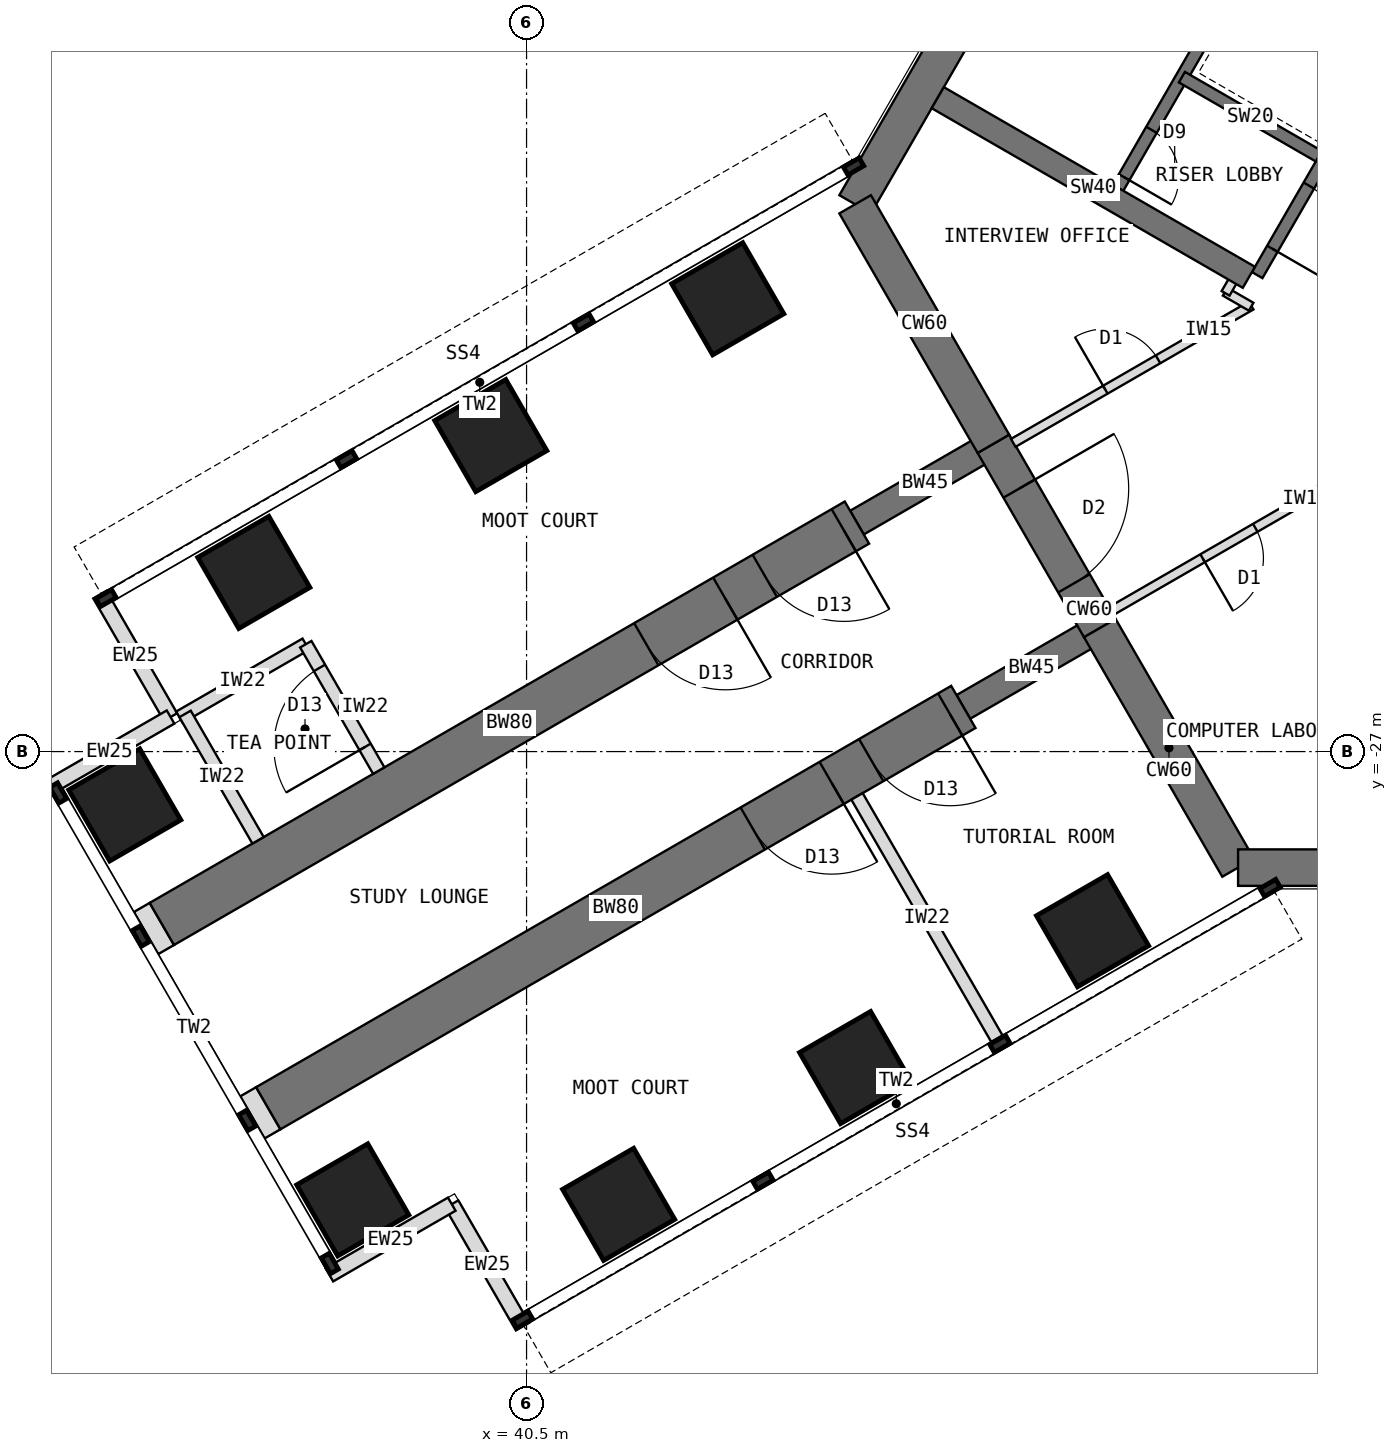
"""IFC4 building model, lengths in metres.
Left out: names, types, materials, properties, quantities, classifications, styles, units other than length and angle.
Written with IfcOpenShell. Run it as: python <this file> out.ifc"""

import sys

from ifc_helpers import new_model, si_unit, direction, frame, frame_2d, origin, origin_2d, place, context, subcontext, project, spatial, rectangle, extrude, element, fill, save


model = new_model("IFC4")
c1 = context("Model", 3, precision=1e-05, world=origin(), true_north=direction((0.0, 1.0)))
c2 = subcontext(c1, "Body", "Model", "MODEL_VIEW")
j1 = project(units=[si_unit("LENGTHUNIT", "METRE"), si_unit("PLANEANGLEUNIT", "RADIAN")], contexts=[c1])
p1 = place(None, origin())
s1 = spatial("IfcSite", under=j1, at=p1, CompositionType="ELEMENT")
p2 = place(p1, origin())
s2 = spatial("IfcBuilding", under=s1, at=p2, CompositionType="ELEMENT")
p3 = place(p2, frame((0.0, 0.0, 101.5)))
s3 = spatial("IfcBuildingStorey", under=s2, at=p3, CompositionType="ELEMENT", Elevation=101.5)
p4 = place(p3, frame((52.202, -7.092, 0.0), z_axis=(0.0, 0.0, 1.0), x_axis=(-0.500005998175, -0.866021940709, 0.0)))
e1 = element("IfcWall", 1, at=p4, inside=s3, PredefinedType="SHEAR", context=c2, shape_type="SweptSolid", body=[
    extrude(rectangle(XDim=12.596, YDim=0.6, at=frame_2d((6.298, 0.0))), origin(), (0.0, 0.0, 1.0), 4.0),
])
p5 = place(p3, frame((45.904, -18.0, 0.0), z_axis=(0.0, 0.0, 1.0), x_axis=(0.500024481964, -0.866011268655, 0.0)))
e2 = element("IfcWall", 2, at=p5, inside=s3, PredefinedType="SHEAR", context=c2, shape_type="SweptSolid", body=[
    extrude(rectangle(XDim=4.548, YDim=0.6, at=frame_2d((2.274, 0.0))), origin(), (0.0, 0.0, 1.0), 4.0),
])
p6 = place(p3, frame((48.178, -21.939, 0.0), z_axis=(0.0, 0.0, 1.0), x_axis=(0.500010275428, -0.866019471182, 0.0)))
e3 = element("IfcWall", 3, at=p6, inside=s3, PredefinedType="SHEAR", context=c2, shape_type="SweptSolid", body=[
    extrude(rectangle(XDim=3.5, YDim=0.6, at=frame_2d((1.75, 0.0))), origin(), (0.0, 0.0, 1.0), 4.0),
])
p7 = place(p6, frame((0.85, 0.0, 0.0)))
e4 = element("IfcOpeningElement", 4, at=p7, cuts=e3, PredefinedType="OPENING", context=c2, shape_type="SweptSolid", body=[
    extrude(rectangle(XDim=1.8, YDim=2.1, at=frame_2d((0.9, 1.05))), frame((0.0, 0.31, 0.0), z_axis=(0.0, -1.0, 0.0), x_axis=(1.0, 0.0, 0.0)), (0.0, 0.0, 1.0), 0.62),
])
p8 = place(p3, frame((49.928, -24.97, 0.0), z_axis=(0.0, 0.0, 1.0), x_axis=(0.499984222037, -0.866034513004, 0.0)))
e5 = element("IfcWall", 5, at=p8, inside=s3, PredefinedType="SHEAR", context=c2, shape_type="SweptSolid", body=[
    extrude(rectangle(XDim=4.548, YDim=0.6, at=frame_2d((2.274, 0.0))), origin(), (0.0, 0.0, 1.0), 4.0),
])
p9 = place(p3, frame((52.202, -28.908, 0.0), z_axis=(0.0, 0.0, 1.0), x_axis=(1.0, 0.0, 0.0)))
e6 = element("IfcWall", 6, at=p9, inside=s3, PredefinedType="SHEAR", context=c2, shape_type="SweptSolid", body=[
    extrude(rectangle(XDim=12.596, YDim=0.6, at=frame_2d((6.298, 0.0))), origin(), (0.0, 0.0, 1.0), 4.0),
])
p10 = place(p3, frame((49.928, -24.97, 0.0), z_axis=(0.0, 0.0, 1.0), x_axis=(-0.866031863473, -0.499988811324, 0.0)))
e7 = element("IfcWall", 7, at=p10, inside=s3, PredefinedType="SHEAR", context=c2, shape_type="SweptSolid", body=[
    extrude(rectangle(XDim=2.592, YDim=0.45, at=frame_2d((1.296, 0.0))), origin(), (0.0, 0.0, 1.0), 4.0),
])
p11 = place(p3, frame((47.684, -26.266, 0.0), z_axis=(0.0, 0.0, 1.0), x_axis=(-0.866027579429, -0.499996231654, 0.0)))
e8 = element("IfcWall", 8, at=p11, inside=s3, PredefinedType="SHEAR", context=c2, shape_type="SweptSolid", body=[
    extrude(rectangle(XDim=13.2, YDim=0.8, at=frame_2d((6.6, 0.0))), origin(), (0.0, 0.0, 1.0), 4.0),
])
p12 = place(p11, frame((0.25, 0.0, 0.0)))
e9 = element("IfcOpeningElement", 9, at=p12, cuts=e8, PredefinedType="OPENING", context=c2, shape_type="SweptSolid", body=[
    extrude(rectangle(XDim=1.5, YDim=2.1, at=frame_2d((0.75, 1.05))), frame((0.0, 0.41, 0.0), z_axis=(0.0, -1.0, 0.0), x_axis=(1.0, 0.0, 0.0)), (0.0, 0.0, 1.0), 0.82),
])
p13 = place(p11, frame((2.5, 0.0, 0.0)))
e10 = element("IfcOpeningElement", 10, at=p13, cuts=e8, PredefinedType="OPENING", context=c2, shape_type="SweptSolid", body=[
    extrude(rectangle(XDim=1.5, YDim=2.1, at=frame_2d((0.75, 1.05))), frame((0.0, 0.41, 0.0), z_axis=(0.0, -1.0, 0.0), x_axis=(1.0, 0.0, 0.0)), (0.0, 0.0, 1.0), 0.82),
])
p14 = place(p3, frame((48.178, -21.939, 0.0), z_axis=(0.0, 0.0, 1.0), x_axis=(-0.866072649678, -0.499918158782, 0.0)))
e11 = element("IfcWall", 11, at=p14, inside=s3, PredefinedType="SHEAR", context=c2, shape_type="SweptSolid", body=[
    extrude(rectangle(XDim=2.592, YDim=0.45, at=frame_2d((1.296, 0.0))), origin(), (0.0, 0.0, 1.0), 4.0),
])
p15 = place(p3, frame((45.934, -23.234, 0.0), z_axis=(0.0, 0.0, 1.0), x_axis=(-0.866019570528, -0.500010103361, 0.0)))
e12 = element("IfcWall", 12, at=p15, inside=s3, PredefinedType="SHEAR", context=c2, shape_type="SweptSolid", body=[
    extrude(rectangle(XDim=13.2, YDim=0.8, at=frame_2d((6.6, 0.0))), origin(), (0.0, 0.0, 1.0), 4.0),
])
p16 = place(p15, frame((0.25, 0.0, 0.0)))
e13 = element("IfcOpeningElement", 13, at=p16, cuts=e12, PredefinedType="OPENING", context=c2, shape_type="SweptSolid", body=[
    extrude(rectangle(XDim=1.5, YDim=2.1, at=frame_2d((0.75, 1.05))), frame((0.0, 0.41, 0.0), z_axis=(0.0, -1.0, 0.0), x_axis=(1.0, 0.0, 0.0)), (0.0, 0.0, 1.0), 0.82),
])
p17 = place(p15, frame((2.5, 0.0, 0.0)))
e14 = element("IfcOpeningElement", 14, at=p17, cuts=e12, PredefinedType="OPENING", context=c2, shape_type="SweptSolid", body=[
    extrude(rectangle(XDim=1.5, YDim=2.1, at=frame_2d((0.75, 1.05))), frame((0.0, 0.41, 0.0), z_axis=(0.0, -1.0, 0.0), x_axis=(1.0, 0.0, 0.0)), (0.0, 0.0, 1.0), 0.82),
])
for number, where, z_axis, x_axis in (
    (15, (49.809, -29.946, 0.0), (0.0, 0.0, 1.0), (0.866, 0.5, 0.0)),
    (16, (43.809, -19.554, 0.0), (0.0, 0.0, 1.0), (0.866, 0.5, 0.0)),
    (17, (45.912, -32.196, 0.0), (0.0, 0.0, 1.0), (0.866, 0.5, 0.0)),
    (18, (39.912, -21.804, 0.0), (0.0, 0.0, 1.0), (0.866, 0.5, 0.0)),
    (19, (42.014, -34.446, 0.0), (0.0, 0.0, 1.0), (0.866, 0.5, 0.0)),
    (20, (36.014, -24.054, 0.0), (0.0, 0.0, 1.0), (0.866, 0.5, 0.0)),
    (21, (37.642, -34.373, 0.0), (0.0, 0.0, 1.0), (0.866, 0.5, 0.0)),
    (22, (33.892, -27.877, 0.0), (0.0, 0.0, 1.0), (0.866, 0.5, 0.0)),
):
    element("IfcColumn", number, at=place(p3, frame(where, z_axis=z_axis, x_axis=x_axis)), inside=s3, PredefinedType="COLUMN", context=c2, shape_type="SweptSolid", body=[
        extrude(rectangle(XDim=1.35, YDim=1.35, at=origin_2d()), origin(), (0.0, 0.0, 1.0), 4.0),
    ])
for number, where, z_axis, x_axis in (
    (23, (40.433, -36.456, 0.0), (0.0, 0.0, 1.0), (-0.5, 0.866, 0.0)),
    (24, (39.27, -34.443, 0.0), (0.0, 0.0, 1.0), (-0.866, -0.5, 0.0)),
    (25, (33.483, -24.419, 0.0), (0.0, 0.0, 1.0), (0.5, -0.866, 0.0)),
    (26, (34.645, -26.432, 0.0), (0.0, 0.0, 1.0), (-0.866, -0.5, 0.0)),
):
    element("IfcWall", number, at=place(p3, frame(where, z_axis=z_axis, x_axis=x_axis)), inside=s3, PredefinedType="STANDARD", context=c2, shape_type="SweptSolid", body=[
        extrude(rectangle(XDim=2.325, YDim=0.25, at=frame_2d((1.163, 0.0))), origin(), (0.0, 0.0, 1.0), 3.8),
    ])
p18 = place(p3, frame((36.252, -32.865, 0.0), z_axis=(0.0, 0.0, 1.0), x_axis=(-0.865778900179, -0.500426713919, 0.0)))
e27 = element("IfcWall", 27, at=p18, inside=s3, PredefinedType="PARTITIONING", context=c2, shape_type="SweptSolid", body=[
    extrude(rectangle(XDim=0.3, YDim=0.8, at=frame_2d((0.15, 0.0))), origin(), (0.0, 0.0, 1.0), 3.8),
])
p19 = place(p3, frame((34.502, -29.834, 0.0), z_axis=(0.0, 0.0, 1.0), x_axis=(-0.866131372301, -0.499816412211, 0.0)))
e28 = element("IfcWall", 28, at=p19, inside=s3, PredefinedType="PARTITIONING", context=c2, shape_type="SweptSolid", body=[
    extrude(rectangle(XDim=0.3, YDim=0.8, at=frame_2d((0.15, 0.0))), origin(), (0.0, 0.0, 1.0), 3.8),
])
p20 = place(p3, frame((56.516, -12.236, 0.0), z_axis=(0.0, 0.0, 1.0), x_axis=(-0.49999894854, -0.866026010844, 0.0)))
e29 = element("IfcWall", 29, at=p20, inside=s3, PredefinedType="SHEAR", context=c2, shape_type="SweptSolid", body=[
    extrude(rectangle(XDim=8.0, YDim=0.2, at=frame_2d((4.0, 0.0))), origin(), (0.0, 0.0, 1.0), 4.0),
])
p21 = place(p20, frame((6.3, 0.0, 0.0)))
e30 = element("IfcOpeningElement", 30, at=p21, cuts=e29, PredefinedType="OPENING", context=c2, shape_type="SweptSolid", body=[
    extrude(rectangle(XDim=1.2, YDim=2.1, at=frame_2d((0.6, 1.05))), frame((0.0, 0.11, 0.0), z_axis=(0.0, -1.0, 0.0), x_axis=(1.0, 0.0, 0.0)), (0.0, 0.0, 1.0), 0.22),
])
p22 = place(p3, frame((53.53, -17.209, 0.0), z_axis=(0.0, 0.0, 1.0), x_axis=(-0.866062058628, 0.499936506574, 0.0)))
e31 = element("IfcWall", 31, at=p22, inside=s3, PredefinedType="SHEAR", context=c2, shape_type="SweptSolid", body=[
    extrude(rectangle(XDim=2.6, YDim=0.2, at=frame_2d((1.3, 0.0))), origin(), (0.0, 0.0, 1.0), 4.0),
])
p23 = place(p3, frame((54.178, -10.886, 0.0), z_axis=(0.0, 0.0, 1.0), x_axis=(-0.49999894854, -0.866026010844, 0.0)))
e32 = element("IfcWall", 32, at=p23, inside=s3, PredefinedType="SHEAR", context=c2, shape_type="SweptSolid", body=[
    extrude(rectangle(XDim=8.0, YDim=0.2, at=frame_2d((4.0, 0.0))), origin(), (0.0, 0.0, 1.0), 4.0),
])
p24 = place(p23, frame((6.8, 0.0, 0.0)))
e33 = element("IfcOpeningElement", 33, at=p24, cuts=e32, PredefinedType="OPENING", context=c2, shape_type="SweptSolid", body=[
    extrude(rectangle(XDim=0.9, YDim=2.1, at=frame_2d((0.45, 1.05))), frame((0.0, 0.11, 0.0), z_axis=(0.0, -1.0, 0.0), x_axis=(1.0, 0.0, 0.0)), (0.0, 0.0, 1.0), 0.22),
])
p25 = place(p3, frame((52.38, -19.201, 0.0), z_axis=(0.0, 0.0, 1.0), x_axis=(-0.866027317282, 0.49999668571, 0.0)))
e34 = element("IfcWall", 34, at=p25, inside=s3, PredefinedType="SHEAR", context=c2, shape_type="SweptSolid", body=[
    extrude(rectangle(XDim=5.908, YDim=0.4, at=frame_2d((2.954, 0.0))), origin(), (0.0, 0.0, 1.0), 4.0),
])
p26 = place(p3, frame((45.935, -27.737, 0.0), z_axis=(0.0, 0.0, 1.0), x_axis=(0.500014953309, -0.866016770315, 0.0)))
e35 = element("IfcWall", 35, at=p26, inside=s3, PredefinedType="PARTITIONING", context=c2, shape_type="SweptSolid", body=[
    extrude(rectangle(XDim=4.6, YDim=0.215, at=frame_2d((2.3, 0.0))), origin(), (0.0, 0.0, 1.0), 3.8),
])
p27 = place(p3, frame((36.869, -25.235, 0.0), z_axis=(0.0, 0.0, 1.0), x_axis=(-0.866050077142, -0.499957262057, 0.0)))
e36 = element("IfcWall", 36, at=p27, inside=s3, PredefinedType="PARTITIONING", context=c2, shape_type="SweptSolid", body=[
    extrude(rectangle(XDim=2.4, YDim=0.215, at=frame_2d((1.2, 0.0))), origin(), (0.0, 0.0, 1.0), 3.8),
])
p28 = place(p3, frame((38.069, -27.313, 0.0), z_axis=(0.0, 0.0, 1.0), x_axis=(-0.500001309137, 0.866024647952, 0.0)))
e37 = element("IfcWall", 37, at=p28, inside=s3, PredefinedType="PARTITIONING", context=c2, shape_type="SweptSolid", body=[
    extrude(rectangle(XDim=2.4, YDim=0.215, at=frame_2d((1.2, 0.0))), origin(), (0.0, 0.0, 1.0), 3.8),
])
p29 = place(p28, frame((0.45, 0.0, 0.0)))
e38 = element("IfcOpeningElement", 38, at=p29, cuts=e37, PredefinedType="OPENING", context=c2, shape_type="SweptSolid", body=[
    extrude(rectangle(XDim=1.5, YDim=2.1, at=frame_2d((0.75, 1.05))), frame((0.0, 0.117, 0.0), z_axis=(0.0, -1.0, 0.0), x_axis=(1.0, 0.0, 0.0)), (0.0, 0.0, 1.0), 0.235),
])
p30 = place(p3, frame((36.084, -28.459, 0.0), z_axis=(0.0, 0.0, 1.0), x_axis=(-0.500001309137, 0.866024647952, 0.0)))
e39 = element("IfcWall", 39, at=p30, inside=s3, PredefinedType="PARTITIONING", context=c2, shape_type="SweptSolid", body=[
    extrude(rectangle(XDim=2.4, YDim=0.215, at=frame_2d((1.2, 0.0))), origin(), (0.0, 0.0, 1.0), 3.8),
])
p31 = place(p3, frame((54.017, -22.436, 0.0), z_axis=(0.0, 0.0, 1.0), x_axis=(-0.86602002524, -0.500009315796, 0.0)))
e40 = element("IfcWall", 40, at=p31, inside=s3, PredefinedType="PARTITIONING", context=c2, shape_type="SweptSolid", body=[
    extrude(rectangle(XDim=4.519, YDim=0.15, at=frame_2d((2.259, 0.0))), origin(), (0.0, 0.0, 1.0), 3.8),
])
p32 = place(p31, frame((1.769, 0.0, 0.0)))
e41 = element("IfcOpeningElement", 41, at=p32, cuts=e40, PredefinedType="OPENING", context=c2, shape_type="SweptSolid", body=[
    extrude(rectangle(XDim=1.0, YDim=2.1, at=frame_2d((0.5, 1.05))), frame((0.0, 0.085, 0.0), z_axis=(0.0, -1.0, 0.0), x_axis=(1.0, 0.0, 0.0)), (0.0, 0.0, 1.0), 0.17),
])
p33 = place(p3, frame((48.504, -21.924, 0.0), z_axis=(0.0, 0.0, 1.0), x_axis=(0.866006515865, 0.500032713409, 0.0)))
e42 = element("IfcWall", 42, at=p33, inside=s3, PredefinedType="PARTITIONING", context=c2, shape_type="SweptSolid", body=[
    extrude(rectangle(XDim=4.518, YDim=0.15, at=frame_2d((2.259, 0.0))), origin(), (0.0, 0.0, 1.0), 3.8),
])
p34 = place(p33, frame((1.749, 0.0, 0.0)))
e43 = element("IfcOpeningElement", 43, at=p34, cuts=e42, PredefinedType="OPENING", context=c2, shape_type="SweptSolid", body=[
    extrude(rectangle(XDim=1.0, YDim=2.1, at=frame_2d((0.5, 1.05))), frame((0.0, 0.085, 0.0), z_axis=(0.0, -1.0, 0.0), x_axis=(1.0, 0.0, 0.0)), (0.0, 0.0, 1.0), 0.17),
])
p35 = place(p3, frame((52.417, -19.684, 0.0), z_axis=(0.0, 0.0, 1.0), x_axis=(-0.865831790172, 0.50033519877, 0.0)))
e44 = element("IfcWall", 44, at=p35, inside=s3, PredefinedType="PARTITIONING", context=c2, shape_type="SweptSolid", body=[
    extrude(rectangle(XDim=0.494, YDim=0.15, at=frame_2d((0.247, 0.0))), origin(), (0.0, 0.0, 1.0), 3.8),
])
p36 = place(p3, frame((51.997, -19.464, 0.0), z_axis=(0.0, 0.0, 1.0), x_axis=(0.499804398801, 0.866138304741, 0.0)))
e45 = element("IfcWall", 45, at=p36, inside=s3, PredefinedType="PARTITIONING", context=c2, shape_type="SweptSolid", body=[
    extrude(rectangle(XDim=0.43, YDim=0.15, at=frame_2d((0.215, 0.0))), origin(), (0.0, 0.0, 1.0), 3.8),
])
p37 = place(p21, origin())
e46 = element("IfcDoor", 46, at=p37, inside=s3, OperationType="SINGLE_SWING_RIGHT", PredefinedType="DOOR", context=c2, shape_type="SweptSolid", body=[
    extrude(rectangle(XDim=1.2, YDim=2.1, at=frame_2d((0.6, 1.05))), frame((0.0, 0.025, 0.0), z_axis=(0.0, -1.0, 0.0), x_axis=(1.0, 0.0, 0.0)), (0.0, 0.0, 1.0), 0.05),
])
fill(e30, e46)
p38 = place(p24, origin())
e47 = element("IfcDoor", 47, at=p38, inside=s3, OperationType="SINGLE_SWING_RIGHT", PredefinedType="DOOR", context=c2, shape_type="SweptSolid", body=[
    extrude(rectangle(XDim=0.9, YDim=2.1, at=frame_2d((0.45, 1.05))), frame((0.0, 0.025, 0.0), z_axis=(0.0, -1.0, 0.0), x_axis=(1.0, 0.0, 0.0)), (0.0, 0.0, 1.0), 0.05),
])
fill(e33, e47)
p39 = place(p7, origin())
e48 = element("IfcDoor", 48, at=p39, inside=s3, OperationType="DOUBLE_DOOR_DOUBLE_SWING", PredefinedType="DOOR", context=c2, shape_type="SweptSolid", body=[
    extrude(rectangle(XDim=1.72, YDim=2.06, at=frame_2d((0.9, 1.03))), frame((0.0, 0.025, 0.0), z_axis=(0.0, -1.0, 0.0), x_axis=(1.0, 0.0, 0.0)), (0.0, 0.0, 1.0), 0.05),
    extrude(rectangle(XDim=0.04, YDim=2.1, at=frame_2d((0.02, 1.05))), frame((0.0, 0.3, 0.0), z_axis=(0.0, -1.0, 0.0), x_axis=(1.0, 0.0, 0.0)), (0.0, 0.0, 1.0), 0.6),
    extrude(rectangle(XDim=0.04, YDim=2.1, at=frame_2d((1.78, 1.05))), frame((0.0, 0.3, 0.0), z_axis=(0.0, -1.0, 0.0), x_axis=(1.0, 0.0, 0.0)), (0.0, 0.0, 1.0), 0.6),
    extrude(rectangle(XDim=1.72, YDim=0.04, at=frame_2d((0.9, 2.08))), frame((0.0, 0.3, 0.0), z_axis=(0.0, -1.0, 0.0), x_axis=(1.0, 0.0, 0.0)), (0.0, 0.0, 1.0), 0.6),
])
fill(e4, e48)
p40 = place(p29, origin())
e49 = element("IfcDoor", 49, at=p40, inside=s3, OperationType="DOUBLE_DOOR_SINGLE_SWING", PredefinedType="DOOR", context=c2, shape_type="SweptSolid", body=[
    extrude(rectangle(XDim=1.5, YDim=2.1, at=frame_2d((0.75, 1.05))), frame((0.0, 0.025, 0.0), z_axis=(0.0, -1.0, 0.0), x_axis=(1.0, 0.0, 0.0)), (0.0, 0.0, 1.0), 0.05),
])
fill(e38, e49)
p41 = place(p34, origin())
e50 = element("IfcDoor", 50, at=p41, inside=s3, OperationType="SINGLE_SWING_LEFT", PredefinedType="DOOR", context=c2, shape_type="SweptSolid", body=[
    extrude(rectangle(XDim=1.0, YDim=2.1, at=frame_2d((0.5, 1.05))), frame((0.0, 0.025, 0.0), z_axis=(0.0, -1.0, 0.0), x_axis=(1.0, 0.0, 0.0)), (0.0, 0.0, 1.0), 0.05),
])
fill(e43, e50)
p42 = place(p32, origin())
e51 = element("IfcDoor", 51, at=p42, inside=s3, OperationType="SINGLE_SWING_RIGHT", PredefinedType="DOOR", context=c2, shape_type="SweptSolid", body=[
    extrude(rectangle(XDim=1.0, YDim=2.1, at=frame_2d((0.5, 1.05))), frame((0.0, 0.025, 0.0), z_axis=(0.0, -1.0, 0.0), x_axis=(1.0, 0.0, 0.0)), (0.0, 0.0, 1.0), 0.05),
])
fill(e41, e51)
p43 = place(p12, origin())
e52 = element("IfcDoor", 52, at=p43, inside=s3, OperationType="DOUBLE_DOOR_SINGLE_SWING", PredefinedType="DOOR", context=c2, shape_type="SweptSolid", body=[
    extrude(rectangle(XDim=1.42, YDim=2.06, at=frame_2d((0.75, 1.03))), frame((0.0, 0.025, 0.0), z_axis=(0.0, -1.0, 0.0), x_axis=(1.0, 0.0, 0.0)), (0.0, 0.0, 1.0), 0.05),
    extrude(rectangle(XDim=0.04, YDim=2.1, at=frame_2d((0.02, 1.05))), frame((0.0, 0.4, 0.0), z_axis=(0.0, -1.0, 0.0), x_axis=(1.0, 0.0, 0.0)), (0.0, 0.0, 1.0), 0.8),
    extrude(rectangle(XDim=0.04, YDim=2.1, at=frame_2d((1.48, 1.05))), frame((0.0, 0.4, 0.0), z_axis=(0.0, -1.0, 0.0), x_axis=(1.0, 0.0, 0.0)), (0.0, 0.0, 1.0), 0.8),
    extrude(rectangle(XDim=1.42, YDim=0.04, at=frame_2d((0.75, 2.08))), frame((0.0, 0.4, 0.0), z_axis=(0.0, -1.0, 0.0), x_axis=(1.0, 0.0, 0.0)), (0.0, 0.0, 1.0), 0.8),
])
fill(e9, e52)
p44 = place(p13, origin())
e53 = element("IfcDoor", 53, at=p44, inside=s3, OperationType="DOUBLE_DOOR_SINGLE_SWING", PredefinedType="DOOR", context=c2, shape_type="SweptSolid", body=[
    extrude(rectangle(XDim=1.42, YDim=2.06, at=frame_2d((0.75, 1.03))), frame((0.0, 0.025, 0.0), z_axis=(0.0, -1.0, 0.0), x_axis=(1.0, 0.0, 0.0)), (0.0, 0.0, 1.0), 0.05),
    extrude(rectangle(XDim=0.04, YDim=2.1, at=frame_2d((0.02, 1.05))), frame((0.0, 0.4, 0.0), z_axis=(0.0, -1.0, 0.0), x_axis=(1.0, 0.0, 0.0)), (0.0, 0.0, 1.0), 0.8),
    extrude(rectangle(XDim=0.04, YDim=2.1, at=frame_2d((1.48, 1.05))), frame((0.0, 0.4, 0.0), z_axis=(0.0, -1.0, 0.0), x_axis=(1.0, 0.0, 0.0)), (0.0, 0.0, 1.0), 0.8),
    extrude(rectangle(XDim=1.42, YDim=0.04, at=frame_2d((0.75, 2.08))), frame((0.0, 0.4, 0.0), z_axis=(0.0, -1.0, 0.0), x_axis=(1.0, 0.0, 0.0)), (0.0, 0.0, 1.0), 0.8),
])
fill(e10, e53)
p45 = place(p16, origin())
e54 = element("IfcDoor", 54, at=p45, inside=s3, OperationType="DOUBLE_DOOR_SINGLE_SWING", PredefinedType="DOOR", context=c2, shape_type="SweptSolid", body=[
    extrude(rectangle(XDim=1.42, YDim=2.06, at=frame_2d((0.75, 1.03))), frame((0.0, 0.025, 0.0), z_axis=(0.0, -1.0, 0.0), x_axis=(1.0, 0.0, 0.0)), (0.0, 0.0, 1.0), 0.05),
    extrude(rectangle(XDim=0.04, YDim=2.1, at=frame_2d((0.02, 1.05))), frame((0.0, 0.4, 0.0), z_axis=(0.0, -1.0, 0.0), x_axis=(1.0, 0.0, 0.0)), (0.0, 0.0, 1.0), 0.8),
    extrude(rectangle(XDim=0.04, YDim=2.1, at=frame_2d((1.48, 1.05))), frame((0.0, 0.4, 0.0), z_axis=(0.0, -1.0, 0.0), x_axis=(1.0, 0.0, 0.0)), (0.0, 0.0, 1.0), 0.8),
    extrude(rectangle(XDim=1.42, YDim=0.04, at=frame_2d((0.75, 2.08))), frame((0.0, 0.4, 0.0), z_axis=(0.0, -1.0, 0.0), x_axis=(1.0, 0.0, 0.0)), (0.0, 0.0, 1.0), 0.8),
])
fill(e13, e54)
p46 = place(p17, origin())
e55 = element("IfcDoor", 55, at=p46, inside=s3, OperationType="DOUBLE_DOOR_SINGLE_SWING", PredefinedType="DOOR", context=c2, shape_type="SweptSolid", body=[
    extrude(rectangle(XDim=1.42, YDim=2.06, at=frame_2d((0.75, 1.03))), frame((0.0, 0.025, 0.0), z_axis=(0.0, -1.0, 0.0), x_axis=(1.0, 0.0, 0.0)), (0.0, 0.0, 1.0), 0.05),
    extrude(rectangle(XDim=0.04, YDim=2.1, at=frame_2d((0.02, 1.05))), frame((0.0, 0.4, 0.0), z_axis=(0.0, -1.0, 0.0), x_axis=(1.0, 0.0, 0.0)), (0.0, 0.0, 1.0), 0.8),
    extrude(rectangle(XDim=0.04, YDim=2.1, at=frame_2d((1.48, 1.05))), frame((0.0, 0.4, 0.0), z_axis=(0.0, -1.0, 0.0), x_axis=(1.0, 0.0, 0.0)), (0.0, 0.0, 1.0), 0.8),
    extrude(rectangle(XDim=1.42, YDim=0.04, at=frame_2d((0.75, 2.08))), frame((0.0, 0.4, 0.0), z_axis=(0.0, -1.0, 0.0), x_axis=(1.0, 0.0, 0.0)), (0.0, 0.0, 1.0), 0.8),
])
fill(e14, e55)
save(model, sys.argv[1])
